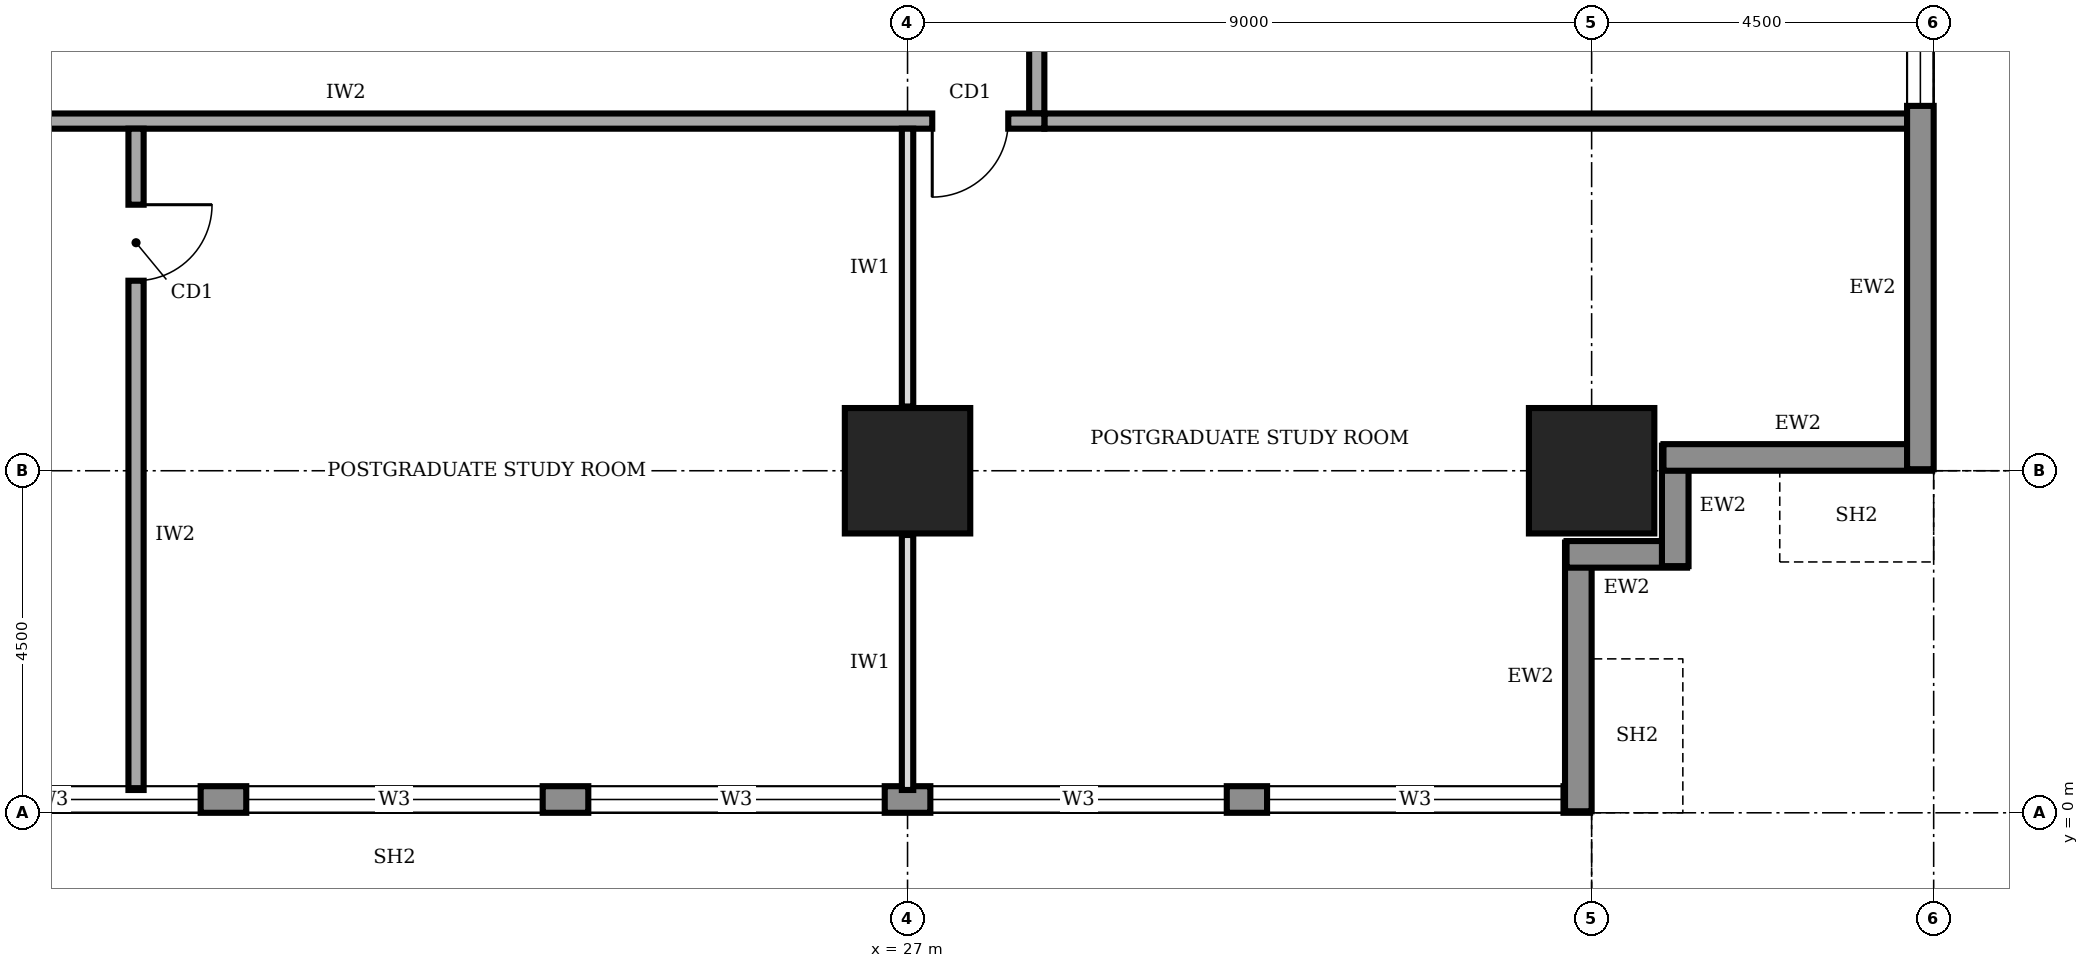
"""IFC4 building model, lengths in metres.
Left out: names, types, materials, properties, quantities, classifications, styles, units other than length and angle.
Written with IfcOpenShell. Run it as: python <this file> out.ifc"""

import sys

from ifc_helpers import new_model, si_unit, direction, frame, frame_2d, origin, origin_2d, place, context, subcontext, project, spatial, rectangle, extrude, element, fill, save


model = new_model("IFC4")
c1 = context("Model", 3, precision=1e-05, world=origin(), true_north=direction((0.0, 1.0)))
c2 = subcontext(c1, "Body", "Model", "MODEL_VIEW")
j1 = project(units=[si_unit("LENGTHUNIT", "METRE"), si_unit("PLANEANGLEUNIT", "RADIAN")], contexts=[c1])
p1 = place(None, origin())
s1 = spatial("IfcSite", under=j1, at=p1, CompositionType="ELEMENT")
p2 = place(p1, origin())
s2 = spatial("IfcBuilding", under=s1, at=p2, CompositionType="ELEMENT")
p3 = place(p2, frame((0.0, 0.0, 185.0)))
s3 = spatial("IfcBuildingStorey", under=s2, at=p3, CompositionType="ELEMENT", Elevation=185.0)
for number, where, z_axis, x_axis in (
    (1, (27.0, 4.5, 0.0), (0.0, 0.0, 1.0), (1.0, 0.0, 0.0)),
    (2, (36.0, 4.5, 0.0), (0.0, 0.0, 1.0), (1.0, 0.0, 0.0)),
):
    element("IfcColumn", number, at=place(p3, frame(where, z_axis=z_axis, x_axis=x_axis)), inside=s3, PredefinedType="COLUMN", context=c2, shape_type="SweptSolid", body=[
        extrude(rectangle(XDim=1.65, YDim=1.65, at=origin_2d()), origin(), (0.0, 0.0, 1.0), 4.0),
    ])
p4 = place(p3, frame((4.52, 0.175, 0.0), z_axis=(0.0, 0.0, 1.0), x_axis=(1.0, 0.0, 0.0)))
e3 = element("IfcWall", 3, at=p4, inside=s3, PredefinedType="STANDARD", context=c2, shape_type="SweptSolid", body=[
    extrude(rectangle(XDim=31.46, YDim=0.35, at=frame_2d((15.73, 0.0))), origin(), (0.0, 0.0, 1.0), 3.75),
])
p5 = place(p4, frame((4.78, 0.0, 0.95)))
e4 = element("IfcOpeningElement", 4, at=p5, cuts=e3, PredefinedType="OPENING", context=c2, shape_type="SweptSolid", body=[
    extrude(rectangle(XDim=3.9, YDim=1.8, at=frame_2d((1.95, 0.9))), frame((0.0, 0.185, 0.0), z_axis=(0.0, -1.0, 0.0), x_axis=(1.0, 0.0, 0.0)), (0.0, 0.0, 1.0), 0.37),
])
p6 = place(p4, frame((9.28, 0.0, 0.95)))
e5 = element("IfcOpeningElement", 5, at=p6, cuts=e3, PredefinedType="OPENING", context=c2, shape_type="SweptSolid", body=[
    extrude(rectangle(XDim=3.9, YDim=1.8, at=frame_2d((1.95, 0.9))), frame((0.0, 0.185, 0.0), z_axis=(0.0, -1.0, 0.0), x_axis=(1.0, 0.0, 0.0)), (0.0, 0.0, 1.0), 0.37),
])
p7 = place(p4, frame((13.78, 0.0, 0.95)))
e6 = element("IfcOpeningElement", 6, at=p7, cuts=e3, PredefinedType="OPENING", context=c2, shape_type="SweptSolid", body=[
    extrude(rectangle(XDim=3.9, YDim=1.8, at=frame_2d((1.95, 0.9))), frame((0.0, 0.185, 0.0), z_axis=(0.0, -1.0, 0.0), x_axis=(1.0, 0.0, 0.0)), (0.0, 0.0, 1.0), 0.37),
])
p8 = place(p4, frame((18.28, 0.0, 0.95)))
e7 = element("IfcOpeningElement", 7, at=p8, cuts=e3, PredefinedType="OPENING", context=c2, shape_type="SweptSolid", body=[
    extrude(rectangle(XDim=3.9, YDim=1.8, at=frame_2d((1.95, 0.9))), frame((0.0, 0.185, 0.0), z_axis=(0.0, -1.0, 0.0), x_axis=(1.0, 0.0, 0.0)), (0.0, 0.0, 1.0), 0.37),
])
p9 = place(p4, frame((22.78, 0.0, 0.95)))
e8 = element("IfcOpeningElement", 8, at=p9, cuts=e3, PredefinedType="OPENING", context=c2, shape_type="SweptSolid", body=[
    extrude(rectangle(XDim=3.9, YDim=1.8, at=frame_2d((1.95, 0.9))), frame((0.0, 0.185, 0.0), z_axis=(0.0, -1.0, 0.0), x_axis=(1.0, 0.0, 0.0)), (0.0, 0.0, 1.0), 0.37),
])
p10 = place(p4, frame((27.21, 0.0, 0.95)))
e9 = element("IfcOpeningElement", 9, at=p10, cuts=e3, PredefinedType="OPENING", context=c2, shape_type="SweptSolid", body=[
    extrude(rectangle(XDim=3.9, YDim=1.8, at=frame_2d((1.95, 0.9))), frame((0.0, 0.185, 0.0), z_axis=(0.0, -1.0, 0.0), x_axis=(1.0, 0.0, 0.0)), (0.0, 0.0, 1.0), 0.37),
])
p11 = place(p3, frame((35.825, 0.02, 0.0), z_axis=(0.0, 0.0, 1.0), x_axis=(0.0, 1.0, 0.0)))
e10 = element("IfcWall", 10, at=p11, inside=s3, PredefinedType="STANDARD", context=c2, shape_type="SweptSolid", body=[
    extrude(rectangle(XDim=3.535, YDim=0.35, at=frame_2d((1.768, 0.0))), origin(), (0.0, 0.0, 1.0), 2.85),
])
for number, where, z_axis, x_axis in (
    (11, (35.67, 3.4, 0.0), (0.0, 0.0, 1.0), (1.0, 0.0, 0.0)),
    (12, (37.1, 3.245, 0.0), (0.0, 0.0, 1.0), (0.0, 1.0, 0.0)),
):
    element("IfcWall", number, at=place(p3, frame(where, z_axis=z_axis, x_axis=x_axis)), inside=s3, PredefinedType="STANDARD", context=c2, shape_type="SweptSolid", body=[
        extrude(rectangle(XDim=1.585, YDim=0.35, at=frame_2d((0.792, 0.0))), origin(), (0.0, 0.0, 1.0), 3.75),
    ])
p12 = place(p3, frame((36.945, 4.675, 0.0), z_axis=(0.0, 0.0, 1.0), x_axis=(1.0, 0.0, 0.0)))
e13 = element("IfcWall", 13, at=p12, inside=s3, PredefinedType="STANDARD", context=c2, shape_type="SweptSolid", body=[
    extrude(rectangle(XDim=3.535, YDim=0.35, at=frame_2d((1.768, 0.0))), origin(), (0.0, 0.0, 1.0), 2.85),
])
p13 = place(p3, frame((40.325, 4.52, 0.0), z_axis=(0.0, 0.0, 1.0), x_axis=(0.0, 1.0, 0.0)))
e14 = element("IfcWall", 14, at=p13, inside=s3, PredefinedType="STANDARD", context=c2, shape_type="SweptSolid", body=[
    extrude(rectangle(XDim=31.46, YDim=0.35, at=frame_2d((15.73, 0.0))), origin(), (0.0, 0.0, 1.0), 3.75),
])
p14 = place(p13, frame((4.78, 0.0, 0.95)))
e15 = element("IfcOpeningElement", 15, at=p14, cuts=e14, PredefinedType="OPENING", context=c2, shape_type="SweptSolid", body=[
    extrude(rectangle(XDim=3.9, YDim=1.8, at=frame_2d((1.95, 0.9))), frame((0.0, 0.185, 0.0), z_axis=(0.0, -1.0, 0.0), x_axis=(1.0, 0.0, 0.0)), (0.0, 0.0, 1.0), 0.37),
])
p15 = place(p13, frame((9.28, 0.0, 0.95)))
e16 = element("IfcOpeningElement", 16, at=p15, cuts=e14, PredefinedType="OPENING", context=c2, shape_type="SweptSolid", body=[
    extrude(rectangle(XDim=3.9, YDim=1.8, at=frame_2d((1.95, 0.9))), frame((0.0, 0.185, 0.0), z_axis=(0.0, -1.0, 0.0), x_axis=(1.0, 0.0, 0.0)), (0.0, 0.0, 1.0), 0.37),
])
p16 = place(p13, frame((13.78, 0.0, 0.95)))
e17 = element("IfcOpeningElement", 17, at=p16, cuts=e14, PredefinedType="OPENING", context=c2, shape_type="SweptSolid", body=[
    extrude(rectangle(XDim=3.9, YDim=1.8, at=frame_2d((1.95, 0.9))), frame((0.0, 0.185, 0.0), z_axis=(0.0, -1.0, 0.0), x_axis=(1.0, 0.0, 0.0)), (0.0, 0.0, 1.0), 0.37),
])
p17 = place(p13, frame((18.28, 0.0, 0.95)))
e18 = element("IfcOpeningElement", 18, at=p17, cuts=e14, PredefinedType="OPENING", context=c2, shape_type="SweptSolid", body=[
    extrude(rectangle(XDim=3.9, YDim=1.8, at=frame_2d((1.95, 0.9))), frame((0.0, 0.185, 0.0), z_axis=(0.0, -1.0, 0.0), x_axis=(1.0, 0.0, 0.0)), (0.0, 0.0, 1.0), 0.37),
])
p18 = place(p13, frame((22.78, 0.0, 0.95)))
e19 = element("IfcOpeningElement", 19, at=p18, cuts=e14, PredefinedType="OPENING", context=c2, shape_type="SweptSolid", body=[
    extrude(rectangle(XDim=3.9, YDim=1.8, at=frame_2d((1.95, 0.9))), frame((0.0, 0.185, 0.0), z_axis=(0.0, -1.0, 0.0), x_axis=(1.0, 0.0, 0.0)), (0.0, 0.0, 1.0), 0.37),
])
p19 = place(p13, frame((27.21, 0.0, 0.95)))
e20 = element("IfcOpeningElement", 20, at=p19, cuts=e14, PredefinedType="OPENING", context=c2, shape_type="SweptSolid", body=[
    extrude(rectangle(XDim=3.9, YDim=1.8, at=frame_2d((1.95, 0.9))), frame((0.0, 0.185, 0.0), z_axis=(0.0, -1.0, 0.0), x_axis=(1.0, 0.0, 0.0)), (0.0, 0.0, 1.0), 0.37),
])
p20 = place(p3, frame((11.9, 9.1, 0.0), z_axis=(0.0, 0.0, 1.0), x_axis=(1.0, 0.0, 0.0)))
e21 = element("IfcWall", 21, at=p20, inside=s3, PredefinedType="SOLIDWALL", context=c2, shape_type="SweptSolid", body=[
    extrude(rectangle(XDim=16.9, YDim=0.2, at=frame_2d((8.45, 0.0))), origin(), (0.0, 0.0, 1.0), 3.75),
])
p21 = place(p20, frame((15.425, 0.0, 0.0)))
e22 = element("IfcOpeningElement", 22, at=p21, cuts=e21, PredefinedType="OPENING", context=c2, shape_type="SweptSolid", body=[
    extrude(rectangle(XDim=1.0, YDim=2.1, at=frame_2d((0.5, 1.05))), frame((0.0, 0.11, 0.0), z_axis=(0.0, -1.0, 0.0), x_axis=(1.0, 0.0, 0.0)), (0.0, 0.0, 1.0), 0.22),
])
p22 = place(p3, frame((28.7, 9.2, 0.0), z_axis=(0.0, 0.0, 1.0), x_axis=(0.0, 1.0, 0.0)))
e23 = element("IfcWall", 23, at=p22, inside=s3, PredefinedType="SOLIDWALL", context=c2, shape_type="SweptSolid", body=[
    extrude(rectangle(XDim=22.3, YDim=0.2, at=frame_2d((11.15, 0.0))), origin(), (0.0, 0.0, 1.0), 3.75),
])
p23 = place(p22, frame((1.55, 0.0, 0.0)))
e24 = element("IfcOpeningElement", 24, at=p23, cuts=e23, PredefinedType="OPENING", context=c2, shape_type="SweptSolid", body=[
    extrude(rectangle(XDim=1.0, YDim=2.1, at=frame_2d((0.5, 1.05))), frame((0.0, 0.11, 0.0), z_axis=(0.0, -1.0, 0.0), x_axis=(1.0, 0.0, 0.0)), (0.0, 0.0, 1.0), 0.22),
])
p24 = place(p22, frame((6.05, 0.0, 0.0)))
e25 = element("IfcOpeningElement", 25, at=p24, cuts=e23, PredefinedType="OPENING", context=c2, shape_type="SweptSolid", body=[
    extrude(rectangle(XDim=1.0, YDim=2.1, at=frame_2d((0.5, 1.05))), frame((0.0, 0.11, 0.0), z_axis=(0.0, -1.0, 0.0), x_axis=(1.0, 0.0, 0.0)), (0.0, 0.0, 1.0), 0.22),
])
p25 = place(p22, frame((10.55, 0.0, 0.0)))
e26 = element("IfcOpeningElement", 26, at=p25, cuts=e23, PredefinedType="OPENING", context=c2, shape_type="SweptSolid", body=[
    extrude(rectangle(XDim=1.0, YDim=2.1, at=frame_2d((0.5, 1.05))), frame((0.0, 0.11, 0.0), z_axis=(0.0, -1.0, 0.0), x_axis=(1.0, 0.0, 0.0)), (0.0, 0.0, 1.0), 0.22),
])
p26 = place(p22, frame((15.05, 0.0, 0.0)))
e27 = element("IfcOpeningElement", 27, at=p26, cuts=e23, PredefinedType="OPENING", context=c2, shape_type="SweptSolid", body=[
    extrude(rectangle(XDim=1.0, YDim=2.1, at=frame_2d((0.5, 1.05))), frame((0.0, 0.11, 0.0), z_axis=(0.0, -1.0, 0.0), x_axis=(1.0, 0.0, 0.0)), (0.0, 0.0, 1.0), 0.22),
])
p27 = place(p22, frame((19.55, 0.0, 0.0)))
e28 = element("IfcOpeningElement", 28, at=p27, cuts=e23, PredefinedType="OPENING", context=c2, shape_type="SweptSolid", body=[
    extrude(rectangle(XDim=1.0, YDim=2.1, at=frame_2d((0.5, 1.05))), frame((0.0, 0.11, 0.0), z_axis=(0.0, -1.0, 0.0), x_axis=(1.0, 0.0, 0.0)), (0.0, 0.0, 1.0), 0.22),
])
p28 = place(p3, frame((16.85, 9.0, 0.0), z_axis=(0.0, 0.0, 1.0), x_axis=(0.0, -1.0, 0.0)))
e29 = element("IfcWall", 29, at=p28, inside=s3, PredefinedType="SOLIDWALL", context=c2, shape_type="SweptSolid", body=[
    extrude(rectangle(XDim=8.7, YDim=0.2, at=frame_2d((4.35, 0.0))), origin(), (0.0, 0.0, 1.0), 3.75),
])
p29 = place(p28, frame((1.0, 0.0, 0.0)))
e30 = element("IfcOpeningElement", 30, at=p29, cuts=e29, PredefinedType="OPENING", context=c2, shape_type="SweptSolid", body=[
    extrude(rectangle(XDim=1.0, YDim=2.1, at=frame_2d((0.5, 1.05))), frame((0.0, 0.11, 0.0), z_axis=(0.0, -1.0, 0.0), x_axis=(1.0, 0.0, 0.0)), (0.0, 0.0, 1.0), 0.22),
])
p30 = place(p3, frame((28.8, 9.1, 0.0), z_axis=(0.0, 0.0, 1.0), x_axis=(1.0, 0.0, 0.0)))
e31 = element("IfcWall", 31, at=p30, inside=s3, PredefinedType="SOLIDWALL", context=c2, shape_type="SweptSolid", body=[
    extrude(rectangle(XDim=11.4, YDim=0.2, at=frame_2d((5.7, 0.0))), origin(), (0.0, 0.0, 1.0), 3.75),
])
p31 = place(p3, frame((27.0, 0.3, 0.0), z_axis=(0.0, 0.0, 1.0), x_axis=(0.0, 1.0, 0.0)))
e32 = element("IfcWall", 32, at=p31, inside=s3, PredefinedType="PARTITIONING", context=c2, shape_type="SweptSolid", body=[
    extrude(rectangle(XDim=3.355, YDim=0.15, at=frame_2d((1.677, 0.0))), origin(), (0.0, 0.0, 1.0), 2.85),
])
p32 = place(p3, frame((27.0, 5.345, 0.0), z_axis=(0.0, 0.0, 1.0), x_axis=(0.0, 1.0, 0.0)))
e33 = element("IfcWall", 33, at=p32, inside=s3, PredefinedType="PARTITIONING", context=c2, shape_type="SweptSolid", body=[
    extrude(rectangle(XDim=3.655, YDim=0.15, at=frame_2d((1.828, 0.0))), origin(), (0.0, 0.0, 1.0), 2.85),
])
p33 = place(p6, origin())
e34 = element("IfcWindow", 34, at=p33, inside=s3, PartitioningType="SINGLE_PANEL", PredefinedType="WINDOW", context=c2, shape_type="SweptSolid", body=[
    extrude(rectangle(XDim=3.9, YDim=1.8, at=frame_2d((1.95, 0.9))), frame((0.0, 0.03, 0.0), z_axis=(0.0, -1.0, 0.0), x_axis=(1.0, 0.0, 0.0)), (0.0, 0.0, 1.0), 0.06),
])
fill(e5, e34)
p34 = place(p7, origin())
e35 = element("IfcWindow", 35, at=p34, inside=s3, PartitioningType="SINGLE_PANEL", PredefinedType="WINDOW", context=c2, shape_type="SweptSolid", body=[
    extrude(rectangle(XDim=3.9, YDim=1.8, at=frame_2d((1.95, 0.9))), frame((0.0, 0.03, 0.0), z_axis=(0.0, -1.0, 0.0), x_axis=(1.0, 0.0, 0.0)), (0.0, 0.0, 1.0), 0.06),
])
fill(e6, e35)
p35 = place(p8, origin())
e36 = element("IfcWindow", 36, at=p35, inside=s3, PartitioningType="SINGLE_PANEL", PredefinedType="WINDOW", context=c2, shape_type="SweptSolid", body=[
    extrude(rectangle(XDim=3.9, YDim=1.8, at=frame_2d((1.95, 0.9))), frame((0.0, 0.03, 0.0), z_axis=(0.0, -1.0, 0.0), x_axis=(1.0, 0.0, 0.0)), (0.0, 0.0, 1.0), 0.06),
])
fill(e7, e36)
p36 = place(p9, origin())
e37 = element("IfcWindow", 37, at=p36, inside=s3, PartitioningType="SINGLE_PANEL", PredefinedType="WINDOW", context=c2, shape_type="SweptSolid", body=[
    extrude(rectangle(XDim=3.9, YDim=1.8, at=frame_2d((1.95, 0.9))), frame((0.0, 0.03, 0.0), z_axis=(0.0, -1.0, 0.0), x_axis=(1.0, 0.0, 0.0)), (0.0, 0.0, 1.0), 0.06),
])
fill(e8, e37)
p37 = place(p10, origin())
e38 = element("IfcWindow", 38, at=p37, inside=s3, PartitioningType="SINGLE_PANEL", PredefinedType="WINDOW", context=c2, shape_type="SweptSolid", body=[
    extrude(rectangle(XDim=3.9, YDim=1.8, at=frame_2d((1.95, 0.9))), frame((0.0, 0.03, 0.0), z_axis=(0.0, -1.0, 0.0), x_axis=(1.0, 0.0, 0.0)), (0.0, 0.0, 1.0), 0.06),
])
fill(e9, e38)
p38 = place(p14, origin())
e39 = element("IfcWindow", 39, at=p38, inside=s3, PartitioningType="SINGLE_PANEL", PredefinedType="WINDOW", context=c2, shape_type="SweptSolid", body=[
    extrude(rectangle(XDim=3.9, YDim=1.8, at=frame_2d((1.95, 0.9))), frame((0.0, 0.03, 0.0), z_axis=(0.0, -1.0, 0.0), x_axis=(1.0, 0.0, 0.0)), (0.0, 0.0, 1.0), 0.06),
])
fill(e15, e39)
p39 = place(p21, frame((1.0, 0.0, 0.0), z_axis=(0.0, 0.0, 1.0), x_axis=(-1.0, 0.0, 0.0)))
e40 = element("IfcDoor", 40, at=p39, inside=s3, OperationType="SINGLE_SWING_RIGHT", PredefinedType="DOOR", context=c2, shape_type="SweptSolid", body=[
    extrude(rectangle(XDim=1.0, YDim=2.1, at=frame_2d((0.5, 1.05))), frame((0.0, 0.025, 0.0), z_axis=(0.0, -1.0, 0.0), x_axis=(1.0, 0.0, 0.0)), (0.0, 0.0, 1.0), 0.05),
])
fill(e22, e40)
p40 = place(p29, origin())
e41 = element("IfcDoor", 41, at=p40, inside=s3, OperationType="SINGLE_SWING_LEFT", PredefinedType="DOOR", context=c2, shape_type="SweptSolid", body=[
    extrude(rectangle(XDim=1.0, YDim=2.1, at=frame_2d((0.5, 1.05))), frame((0.0, 0.025, 0.0), z_axis=(0.0, -1.0, 0.0), x_axis=(1.0, 0.0, 0.0)), (0.0, 0.0, 1.0), 0.05),
])
fill(e30, e41)
save(model, sys.argv[1])
